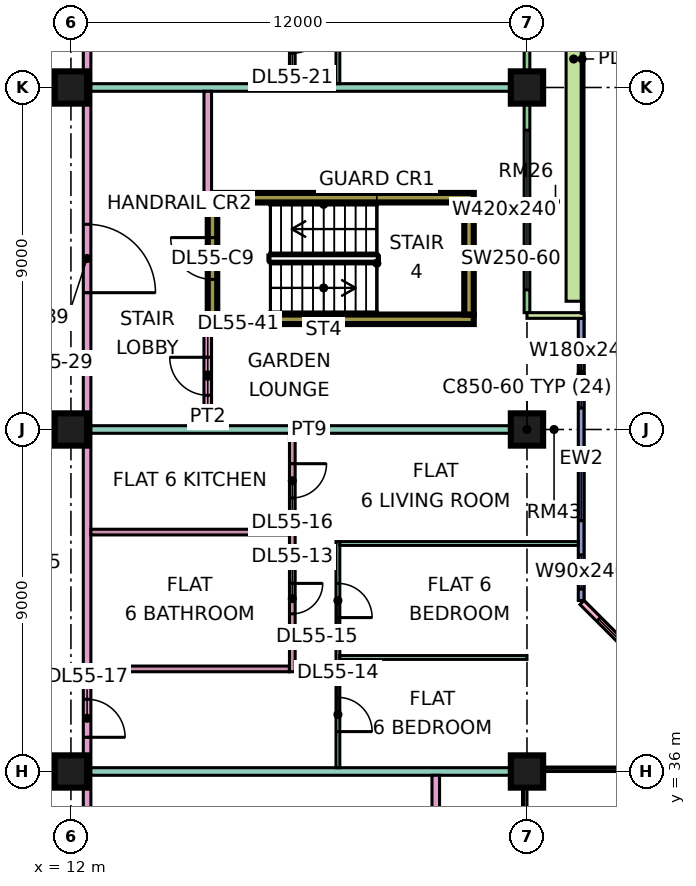
"""IFC4 building model, lengths in metres.
Left out: names, types, materials, properties, quantities, classifications, styles, units other than length and angle.
Written with IfcOpenShell. Run it as: python <this file> out.ifc"""

import sys

from ifc_helpers import new_model, si_unit, direction, frame, frame_2d, origin, origin_2d, place, context, subcontext, project, spatial, rectangle, extrude, element, fill, save


model = new_model("IFC4")
c1 = context("Model", 3, precision=1e-05, world=origin(), true_north=direction((0.0, 1.0)))
c2 = subcontext(c1, "Body", "Model", "MODEL_VIEW")
j1 = project(units=[si_unit("LENGTHUNIT", "METRE"), si_unit("PLANEANGLEUNIT", "RADIAN")], contexts=[c1])
p1 = place(None, origin())
s1 = spatial("IfcSite", under=j1, at=p1, CompositionType="ELEMENT")
p2 = place(p1, origin())
s2 = spatial("IfcBuilding", under=s1, at=p2, CompositionType="ELEMENT")
p3 = place(p2, frame((0.0, 0.0, 234.15)))
s3 = spatial("IfcBuildingStorey", under=s2, at=p3, CompositionType="ELEMENT", Elevation=234.15)
for number, where, z_axis, x_axis in (
    (1, (12.0, 36.0, 0.0), (0.0, 0.0, 1.0), (1.0, 0.0, 0.0)),
    (2, (12.0, 45.0, 0.0), (0.0, 0.0, 1.0), (1.0, 0.0, 0.0)),
    (3, (12.0, 54.0, 0.0), (0.0, 0.0, 1.0), (1.0, 0.0, 0.0)),
    (4, (24.0, 36.0, 0.0), (0.0, 0.0, 1.0), (1.0, 0.0, 0.0)),
    (5, (24.0, 45.0, 0.0), (0.0, 0.0, 1.0), (1.0, 0.0, 0.0)),
    (6, (24.0, 54.0, 0.0), (0.0, 0.0, 1.0), (1.0, 0.0, 0.0)),
):
    element("IfcColumn", number, at=place(p3, frame(where, z_axis=z_axis, x_axis=x_axis)), inside=s3, PredefinedType="COLUMN", context=c2, shape_type="SweptSolid", body=[
        extrude(rectangle(XDim=0.85, YDim=0.85, at=origin_2d()), origin(), (0.0, 0.0, 1.0), 3.75),
    ])
for number, where, z_axis, x_axis in (
    (7, (15.6, 47.9, 0.0), (0.0, 0.0, 1.0), (1.0, 0.0, 0.0)),
    (8, (15.6, 51.1, 0.0), (0.0, 0.0, 1.0), (1.0, 0.0, 0.0)),
):
    element("IfcWall", number, at=place(p3, frame(where, z_axis=z_axis, x_axis=x_axis)), inside=s3, PredefinedType="SHEAR", context=c2, shape_type="SweptSolid", body=[
        extrude(rectangle(XDim=7.0, YDim=0.25, at=frame_2d((3.5, 0.0))), origin(), (0.0, 0.0, 1.0), 3.75),
    ])
p4 = place(p3, frame((15.725, 48.025, 0.0), z_axis=(0.0, 0.0, 1.0), x_axis=(0.0, 1.0, 0.0)))
e9 = element("IfcWall", 9, at=p4, inside=s3, PredefinedType="SHEAR", context=c2, shape_type="SweptSolid", body=[
    extrude(rectangle(XDim=2.95, YDim=0.25, at=frame_2d((1.475, 0.0))), origin(), (0.0, 0.0, 1.0), 3.75),
])
p5 = place(p4, frame((0.925, 0.0, 0.0)))
e10 = element("IfcOpeningElement", 10, at=p5, cuts=e9, PredefinedType="OPENING", context=c2, shape_type="SweptSolid", body=[
    extrude(rectangle(XDim=1.1, YDim=2.2, at=frame_2d((0.55, 1.1))), frame((0.0, 0.135, 0.0), z_axis=(0.0, -1.0, 0.0), x_axis=(1.0, 0.0, 0.0)), (0.0, 0.0, 1.0), 0.27),
])
p6 = place(p3, frame((22.475, 48.025, 0.0), z_axis=(0.0, 0.0, 1.0), x_axis=(0.0, 1.0, 0.0)))
e11 = element("IfcWall", 11, at=p6, inside=s3, PredefinedType="SHEAR", context=c2, shape_type="SweptSolid", body=[
    extrude(rectangle(XDim=2.95, YDim=0.25, at=frame_2d((1.475, 0.0))), origin(), (0.0, 0.0, 1.0), 3.75),
])
p7 = place(p3, frame((28.447, 37.447, 0.0), z_axis=(0.0, 0.0, 1.0), x_axis=(-0.707106781187, 0.707106781187, 0.0)))
e12 = element("IfcWall", 12, at=p7, inside=s3, PredefinedType="SOLIDWALL", context=c2, shape_type="SweptSolid", body=[
    extrude(rectangle(XDim=4.243, YDim=0.15, at=frame_2d((2.121, 0.0))), origin(), (0.0, 0.0, 1.0), 3.35),
])
p8 = place(p7, frame((0.621, 0.0, 0.45)))
e13 = element("IfcOpeningElement", 13, at=p8, cuts=e12, PredefinedType="OPENING", context=c2, shape_type="SweptSolid", body=[
    extrude(rectangle(XDim=3.0, YDim=2.4, at=frame_2d((1.5, 1.2))), frame((0.0, 0.085, 0.0), z_axis=(0.0, -1.0, 0.0), x_axis=(1.0, 0.0, 0.0)), (0.0, 0.0, 1.0), 0.17),
])
p9 = place(p3, frame((25.425, 40.5, 0.0), z_axis=(0.0, 0.0, 1.0), x_axis=(0.0, 1.0, 0.0)))
e14 = element("IfcWall", 14, at=p9, inside=s3, PredefinedType="SOLIDWALL", context=c2, shape_type="SweptSolid", body=[
    extrude(rectangle(XDim=7.425, YDim=0.15, at=frame_2d((3.712, 0.0))), origin(), (0.0, 0.0, 1.0), 3.35),
])
p10 = place(p9, frame((0.3, 0.0, 0.45)))
e15 = element("IfcOpeningElement", 15, at=p10, cuts=e14, PredefinedType="OPENING", context=c2, shape_type="SweptSolid", body=[
    extrude(rectangle(XDim=0.9, YDim=2.4, at=frame_2d((0.45, 1.2))), frame((0.0, 0.085, 0.0), z_axis=(0.0, -1.0, 0.0), x_axis=(1.0, 0.0, 0.0)), (0.0, 0.0, 1.0), 0.17),
])
p11 = place(p9, frame((2.1, 0.0, 0.45)))
e16 = element("IfcOpeningElement", 16, at=p11, cuts=e14, PredefinedType="OPENING", context=c2, shape_type="SweptSolid", body=[
    extrude(rectangle(XDim=1.8, YDim=2.4, at=frame_2d((0.9, 1.2))), frame((0.0, 0.085, 0.0), z_axis=(0.0, -1.0, 0.0), x_axis=(1.0, 0.0, 0.0)), (0.0, 0.0, 1.0), 0.17),
])
p12 = place(p9, frame((5.062, 0.0, 0.45)))
e17 = element("IfcOpeningElement", 17, at=p12, cuts=e14, PredefinedType="OPENING", context=c2, shape_type="SweptSolid", body=[
    extrude(rectangle(XDim=1.8, YDim=2.4, at=frame_2d((0.9, 1.2))), frame((0.0, 0.085, 0.0), z_axis=(0.0, -1.0, 0.0), x_axis=(1.0, 0.0, 0.0)), (0.0, 0.0, 1.0), 0.17),
])
p13 = place(p3, frame((24.0, 48.075, 0.0), z_axis=(0.0, 0.0, 1.0), x_axis=(0.0, 1.0, 0.0)))
e18 = element("IfcWall", 18, at=p13, inside=s3, PredefinedType="SOLIDWALL", context=c2, shape_type="SweptSolid", body=[
    extrude(rectangle(XDim=13.35, YDim=0.15, at=frame_2d((6.675, 0.0))), origin(), (0.0, 0.0, 1.0), 3.35),
])
p14 = place(p13, frame((0.6, 0.0, 0.45)))
e19 = element("IfcOpeningElement", 19, at=p14, cuts=e18, PredefinedType="OPENING", context=c2, shape_type="SweptSolid", body=[
    extrude(rectangle(XDim=4.2, YDim=2.4, at=frame_2d((2.1, 1.2))), frame((0.0, 0.085, 0.0), z_axis=(0.0, -1.0, 0.0), x_axis=(1.0, 0.0, 0.0)), (0.0, 0.0, 1.0), 0.17),
])
p15 = place(p13, frame((7.087, 0.0, 0.0)))
e20 = element("IfcOpeningElement", 20, at=p15, cuts=e18, PredefinedType="OPENING", context=c2, shape_type="SweptSolid", body=[
    extrude(rectangle(XDim=1.2, YDim=2.4, at=frame_2d((0.6, 1.2))), frame((0.0, 0.085, 0.0), z_axis=(0.0, -1.0, 0.0), x_axis=(1.0, 0.0, 0.0)), (0.0, 0.0, 1.0), 0.17),
])
p16 = place(p13, frame((9.525, 0.0, 0.45)))
e21 = element("IfcOpeningElement", 21, at=p16, cuts=e18, PredefinedType="OPENING", context=c2, shape_type="SweptSolid", body=[
    extrude(rectangle(XDim=1.8, YDim=2.4, at=frame_2d((0.9, 1.2))), frame((0.0, 0.085, 0.0), z_axis=(0.0, -1.0, 0.0), x_axis=(1.0, 0.0, 0.0)), (0.0, 0.0, 1.0), 0.17),
])
p17 = place(p13, frame((12.188, 0.0, 0.45)))
e22 = element("IfcOpeningElement", 22, at=p17, cuts=e18, PredefinedType="OPENING", context=c2, shape_type="SweptSolid", body=[
    extrude(rectangle(XDim=0.9, YDim=2.4, at=frame_2d((0.45, 1.2))), frame((0.0, 0.085, 0.0), z_axis=(0.0, -1.0, 0.0), x_axis=(1.0, 0.0, 0.0)), (0.0, 0.0, 1.0), 0.17),
])
p18 = place(p3, frame((25.5, 48.0, 0.0), z_axis=(0.0, 0.0, 1.0), x_axis=(-1.0, 0.0, 0.0)))
e23 = element("IfcWall", 23, at=p18, inside=s3, PredefinedType="SOLIDWALL", context=c2, shape_type="SweptSolid", body=[
    extrude(rectangle(XDim=1.5, YDim=0.15, at=frame_2d((0.75, 0.0))), origin(), (0.0, 0.0, 1.0), 3.35),
])
p19 = place(p3, frame((25.229, 48.375, 0.0), z_axis=(0.0, 0.0, 1.0), x_axis=(0.0, 1.0, 0.0)))
e24 = element("IfcWall", 24, at=p19, inside=s3, PredefinedType="SOLIDWALL", context=c2, shape_type="SweptSolid", body=[
    extrude(rectangle(XDim=12.75, YDim=0.4, at=frame_2d((6.375, 0.0))), origin(), (0.0, 0.0, 1.0), 0.7),
])
p20 = place(p3, frame((12.425, 20.0, 0.0), z_axis=(0.0, 0.0, 1.0), x_axis=(0.0, 1.0, 0.0)))
e25 = element("IfcWall", 25, at=p20, inside=s3, PredefinedType="PARTITIONING", context=c2, shape_type="SweptSolid", body=[
    extrude(rectangle(XDim=43.0, YDim=0.2, at=frame_2d((21.5, 0.0))), origin(), (0.0, 0.0, 1.0), 3.35),
])
p21 = place(p20, frame((5.95, 0.0, 0.0)))
e26 = element("IfcOpeningElement", 26, at=p21, cuts=e25, PredefinedType="OPENING", context=c2, shape_type="SweptSolid", body=[
    extrude(rectangle(XDim=1.0, YDim=2.1, at=frame_2d((0.5, 1.05))), frame((0.0, 0.11, 0.0), z_axis=(0.0, -1.0, 0.0), x_axis=(1.0, 0.0, 0.0)), (0.0, 0.0, 1.0), 0.22),
])
p22 = place(p20, frame((12.0, 0.0, 0.0)))
e27 = element("IfcOpeningElement", 27, at=p22, cuts=e25, PredefinedType="OPENING", context=c2, shape_type="SweptSolid", body=[
    extrude(rectangle(XDim=1.0, YDim=2.1, at=frame_2d((0.5, 1.05))), frame((0.0, 0.11, 0.0), z_axis=(0.0, -1.0, 0.0), x_axis=(1.0, 0.0, 0.0)), (0.0, 0.0, 1.0), 0.22),
])
p23 = place(p20, frame((16.9, 0.0, 0.0)))
e28 = element("IfcOpeningElement", 28, at=p23, cuts=e25, PredefinedType="OPENING", context=c2, shape_type="SweptSolid", body=[
    extrude(rectangle(XDim=1.0, YDim=2.1, at=frame_2d((0.5, 1.05))), frame((0.0, 0.11, 0.0), z_axis=(0.0, -1.0, 0.0), x_axis=(1.0, 0.0, 0.0)), (0.0, 0.0, 1.0), 0.22),
])
p24 = place(p20, frame((41.05, 0.0, 0.0)))
e29 = element("IfcOpeningElement", 29, at=p24, cuts=e25, PredefinedType="OPENING", context=c2, shape_type="SweptSolid", body=[
    extrude(rectangle(XDim=1.0, YDim=2.1, at=frame_2d((0.5, 1.05))), frame((0.0, 0.11, 0.0), z_axis=(0.0, -1.0, 0.0), x_axis=(1.0, 0.0, 0.0)), (0.0, 0.0, 1.0), 0.22),
])
p25 = place(p20, frame((1.15, 0.0, 0.0)))
e30 = element("IfcOpeningElement", 30, at=p25, cuts=e25, PredefinedType="OPENING", context=c2, shape_type="SweptSolid", body=[
    extrude(rectangle(XDim=1.8, YDim=2.1, at=frame_2d((0.9, 1.05))), frame((0.0, 0.11, 0.0), z_axis=(0.0, -1.0, 0.0), x_axis=(1.0, 0.0, 0.0)), (0.0, 0.0, 1.0), 0.22),
])
p26 = place(p20, frame((28.6, 0.0, 0.0)))
e31 = element("IfcOpeningElement", 31, at=p26, cuts=e25, PredefinedType="OPENING", context=c2, shape_type="SweptSolid", body=[
    extrude(rectangle(XDim=1.8, YDim=2.1, at=frame_2d((0.9, 1.05))), frame((0.0, 0.11, 0.0), z_axis=(0.0, -1.0, 0.0), x_axis=(1.0, 0.0, 0.0)), (0.0, 0.0, 1.0), 0.22),
])
p27 = place(p3, frame((12.525, 36.0, 0.0), z_axis=(0.0, 0.0, 1.0), x_axis=(1.0, 0.0, 0.0)))
e32 = element("IfcWall", 32, at=p27, inside=s3, PredefinedType="PARTITIONING", context=c2, shape_type="SweptSolid", body=[
    extrude(rectangle(XDim=11.475, YDim=0.2, at=frame_2d((5.738, 0.0))), origin(), (0.0, 0.0, 1.0), 3.35),
])
for number, where, z_axis, x_axis in (
    (33, (12.525, 38.7, 0.0), (0.0, 0.0, 1.0), (1.0, 0.0, 0.0)),
    (34, (12.525, 42.3, 0.0), (0.0, 0.0, 1.0), (1.0, 0.0, 0.0)),
):
    element("IfcWall", number, at=place(p3, frame(where, z_axis=z_axis, x_axis=x_axis)), inside=s3, PredefinedType="PARTITIONING", context=c2, shape_type="SweptSolid", body=[
        extrude(rectangle(XDim=5.225, YDim=0.15, at=frame_2d((2.613, 0.0))), origin(), (0.0, 0.0, 1.0), 3.35),
    ])
p28 = place(p3, frame((12.525, 45.0, 0.0), z_axis=(0.0, 0.0, 1.0), x_axis=(1.0, 0.0, 0.0)))
e35 = element("IfcWall", 35, at=p28, inside=s3, PredefinedType="PARTITIONING", context=c2, shape_type="SweptSolid", body=[
    extrude(rectangle(XDim=11.475, YDim=0.2, at=frame_2d((5.738, 0.0))), origin(), (0.0, 0.0, 1.0), 3.35),
])
p29 = place(p3, frame((12.525, 54.0, 0.0), z_axis=(0.0, 0.0, 1.0), x_axis=(1.0, 0.0, 0.0)))
e36 = element("IfcWall", 36, at=p29, inside=s3, PredefinedType="PARTITIONING", context=c2, shape_type="SweptSolid", body=[
    extrude(rectangle(XDim=11.401, YDim=0.2, at=frame_2d((5.701, 0.0))), origin(), (0.0, 0.0, 1.0), 3.35),
])
p30 = place(p3, frame((15.6, 45.1, 0.0), z_axis=(0.0, 0.0, 1.0), x_axis=(0.0, 1.0, 0.0)))
e37 = element("IfcWall", 37, at=p30, inside=s3, PredefinedType="PARTITIONING", context=c2, shape_type="SweptSolid", body=[
    extrude(rectangle(XDim=2.675, YDim=0.2, at=frame_2d((1.337, 0.0))), origin(), (0.0, 0.0, 1.0), 3.35),
])
p31 = place(p30, frame((0.8, 0.0, 0.0)))
e38 = element("IfcOpeningElement", 38, at=p31, cuts=e37, PredefinedType="OPENING", context=c2, shape_type="SweptSolid", body=[
    extrude(rectangle(XDim=1.0, YDim=2.1, at=frame_2d((0.5, 1.05))), frame((0.0, 0.11, 0.0), z_axis=(0.0, -1.0, 0.0), x_axis=(1.0, 0.0, 0.0)), (0.0, 0.0, 1.0), 0.22),
])
p32 = place(p3, frame((15.6, 51.225, 0.0), z_axis=(0.0, 0.0, 1.0), x_axis=(0.0, 1.0, 0.0)))
e39 = element("IfcWall", 39, at=p32, inside=s3, PredefinedType="PARTITIONING", context=c2, shape_type="SweptSolid", body=[
    extrude(rectangle(XDim=2.675, YDim=0.2, at=frame_2d((1.337, 0.0))), origin(), (0.0, 0.0, 1.0), 3.35),
])
p33 = place(p3, frame((17.825, 38.625, 0.0), z_axis=(0.0, 0.0, 1.0), x_axis=(0.0, 1.0, 0.0)))
e40 = element("IfcWall", 40, at=p33, inside=s3, PredefinedType="PARTITIONING", context=c2, shape_type="SweptSolid", body=[
    extrude(rectangle(XDim=6.275, YDim=0.15, at=frame_2d((3.137, 0.0))), origin(), (0.0, 0.0, 1.0), 3.35),
])
p34 = place(p33, frame((1.525, 0.0, 0.0)))
e41 = element("IfcOpeningElement", 41, at=p34, cuts=e40, PredefinedType="OPENING", context=c2, shape_type="SweptSolid", body=[
    extrude(rectangle(XDim=0.8, YDim=2.1, at=frame_2d((0.4, 1.05))), frame((0.0, 0.085, 0.0), z_axis=(0.0, -1.0, 0.0), x_axis=(1.0, 0.0, 0.0)), (0.0, 0.0, 1.0), 0.17),
])
p35 = place(p33, frame((4.575, 0.0, 0.0)))
e42 = element("IfcOpeningElement", 42, at=p35, cuts=e40, PredefinedType="OPENING", context=c2, shape_type="SweptSolid", body=[
    extrude(rectangle(XDim=0.9, YDim=2.1, at=frame_2d((0.45, 1.05))), frame((0.0, 0.085, 0.0), z_axis=(0.0, -1.0, 0.0), x_axis=(1.0, 0.0, 0.0)), (0.0, 0.0, 1.0), 0.17),
])
p36 = place(p3, frame((17.825, 54.1, 0.0), z_axis=(0.0, 0.0, 1.0), x_axis=(0.0, 1.0, 0.0)))
e43 = element("IfcWall", 43, at=p36, inside=s3, PredefinedType="PARTITIONING", context=c2, shape_type="SweptSolid", body=[
    extrude(rectangle(XDim=5.975, YDim=0.15, at=frame_2d((2.987, 0.0))), origin(), (0.0, 0.0, 1.0), 3.35),
])
p37 = place(p36, frame((3.9, 0.0, 0.0)))
e44 = element("IfcOpeningElement", 44, at=p37, cuts=e43, PredefinedType="OPENING", context=c2, shape_type="SweptSolid", body=[
    extrude(rectangle(XDim=0.8, YDim=2.1, at=frame_2d((0.4, 1.05))), frame((0.0, 0.085, 0.0), z_axis=(0.0, -1.0, 0.0), x_axis=(1.0, 0.0, 0.0)), (0.0, 0.0, 1.0), 0.17),
])
p38 = place(p36, frame((0.8, 0.0, 0.0)))
e45 = element("IfcOpeningElement", 45, at=p38, cuts=e43, PredefinedType="OPENING", context=c2, shape_type="SweptSolid", body=[
    extrude(rectangle(XDim=0.9, YDim=2.1, at=frame_2d((0.45, 1.05))), frame((0.0, 0.085, 0.0), z_axis=(0.0, -1.0, 0.0), x_axis=(1.0, 0.0, 0.0)), (0.0, 0.0, 1.0), 0.17),
])
p39 = place(p3, frame((19.025, 36.1, 0.0), z_axis=(0.0, 0.0, 1.0), x_axis=(0.0, 1.0, 0.0)))
e46 = element("IfcWall", 46, at=p39, inside=s3, PredefinedType="PARTITIONING", context=c2, shape_type="SweptSolid", body=[
    extrude(rectangle(XDim=5.95, YDim=0.1, at=frame_2d((2.975, 0.0))), origin(), (0.0, 0.0, 1.0), 3.35),
])
p40 = place(p39, frame((0.95, 0.0, 0.0)))
e47 = element("IfcOpeningElement", 47, at=p40, cuts=e46, PredefinedType="OPENING", context=c2, shape_type="SweptSolid", body=[
    extrude(rectangle(XDim=0.9, YDim=2.1, at=frame_2d((0.45, 1.05))), frame((0.0, 0.06, 0.0), z_axis=(0.0, -1.0, 0.0), x_axis=(1.0, 0.0, 0.0)), (0.0, 0.0, 1.0), 0.12),
])
p41 = place(p39, frame((3.95, 0.0, 0.0)))
e48 = element("IfcOpeningElement", 48, at=p41, cuts=e46, PredefinedType="OPENING", context=c2, shape_type="SweptSolid", body=[
    extrude(rectangle(XDim=0.9, YDim=2.1, at=frame_2d((0.45, 1.05))), frame((0.0, 0.06, 0.0), z_axis=(0.0, -1.0, 0.0), x_axis=(1.0, 0.0, 0.0)), (0.0, 0.0, 1.0), 0.12),
])
p42 = place(p3, frame((19.025, 54.1, 0.0), z_axis=(0.0, 0.0, 1.0), x_axis=(0.0, 1.0, 0.0)))
e49 = element("IfcWall", 49, at=p42, inside=s3, PredefinedType="PARTITIONING", context=c2, shape_type="SweptSolid", body=[
    extrude(rectangle(XDim=2.85, YDim=0.1, at=frame_2d((1.425, 0.0))), origin(), (0.0, 0.0, 1.0), 3.35),
])
p43 = place(p42, frame((0.95, 0.0, 0.0)))
e50 = element("IfcOpeningElement", 50, at=p43, cuts=e49, PredefinedType="OPENING", context=c2, shape_type="SweptSolid", body=[
    extrude(rectangle(XDim=0.9, YDim=2.1, at=frame_2d((0.45, 1.05))), frame((0.0, 0.06, 0.0), z_axis=(0.0, -1.0, 0.0), x_axis=(1.0, 0.0, 0.0)), (0.0, 0.0, 1.0), 0.12),
])
p44 = place(p3, frame((19.075, 39.0, 0.0), z_axis=(0.0, 0.0, 1.0), x_axis=(1.0, 0.0, 0.0)))
e51 = element("IfcWall", 51, at=p44, inside=s3, PredefinedType="PARTITIONING", context=c2, shape_type="SweptSolid", body=[
    extrude(rectangle(XDim=4.925, YDim=0.1, at=frame_2d((2.462, 0.0))), origin(), (0.0, 0.0, 1.0), 3.35),
])
p45 = place(p3, frame((19.075, 42.0, 0.0), z_axis=(0.0, 0.0, 1.0), x_axis=(1.0, 0.0, 0.0)))
e52 = element("IfcWall", 52, at=p45, inside=s3, PredefinedType="PARTITIONING", context=c2, shape_type="SweptSolid", body=[
    extrude(rectangle(XDim=6.275, YDim=0.1, at=frame_2d((3.138, 0.0))), origin(), (0.0, 0.0, 1.0), 3.35),
])
p46 = place(p3, frame((21.6, 23.9, 0.0), z_axis=(0.0, 0.0, 1.0), x_axis=(0.0, 1.0, 0.0)))
e53 = element("IfcWall", 53, at=p46, inside=s3, PredefinedType="PARTITIONING", context=c2, shape_type="SweptSolid", body=[
    extrude(rectangle(XDim=12.0, YDim=0.2, at=frame_2d((6.0, 0.0))), origin(), (0.0, 0.0, 1.0), 3.35),
])
p47 = place(p8, origin())
e54 = element("IfcWindow", 54, at=p47, inside=s3, PartitioningType="SINGLE_PANEL", PredefinedType="WINDOW", context=c2, shape_type="SweptSolid", body=[
    extrude(rectangle(XDim=3.0, YDim=2.4, at=frame_2d((1.5, 1.2))), frame((0.0, 0.03, 0.0), z_axis=(0.0, -1.0, 0.0), x_axis=(1.0, 0.0, 0.0)), (0.0, 0.0, 1.0), 0.06),
])
fill(e13, e54)
p48 = place(p10, origin())
e55 = element("IfcWindow", 55, at=p48, inside=s3, PartitioningType="SINGLE_PANEL", PredefinedType="WINDOW", context=c2, shape_type="SweptSolid", body=[
    extrude(rectangle(XDim=0.9, YDim=2.4, at=frame_2d((0.45, 1.2))), frame((0.0, 0.03, 0.0), z_axis=(0.0, -1.0, 0.0), x_axis=(1.0, 0.0, 0.0)), (0.0, 0.0, 1.0), 0.06),
])
fill(e15, e55)
p49 = place(p11, origin())
e56 = element("IfcWindow", 56, at=p49, inside=s3, PartitioningType="SINGLE_PANEL", PredefinedType="WINDOW", context=c2, shape_type="SweptSolid", body=[
    extrude(rectangle(XDim=1.8, YDim=2.4, at=frame_2d((0.9, 1.2))), frame((0.0, 0.03, 0.0), z_axis=(0.0, -1.0, 0.0), x_axis=(1.0, 0.0, 0.0)), (0.0, 0.0, 1.0), 0.06),
])
fill(e16, e56)
p50 = place(p12, origin())
e57 = element("IfcWindow", 57, at=p50, inside=s3, PartitioningType="SINGLE_PANEL", PredefinedType="WINDOW", context=c2, shape_type="SweptSolid", body=[
    extrude(rectangle(XDim=1.8, YDim=2.4, at=frame_2d((0.9, 1.2))), frame((0.0, 0.03, 0.0), z_axis=(0.0, -1.0, 0.0), x_axis=(1.0, 0.0, 0.0)), (0.0, 0.0, 1.0), 0.06),
])
fill(e17, e57)
p51 = place(p14, origin())
e58 = element("IfcWindow", 58, at=p51, inside=s3, PartitioningType="SINGLE_PANEL", PredefinedType="WINDOW", context=c2, shape_type="SweptSolid", body=[
    extrude(rectangle(XDim=4.2, YDim=2.4, at=frame_2d((2.1, 1.2))), frame((0.0, 0.03, 0.0), z_axis=(0.0, -1.0, 0.0), x_axis=(1.0, 0.0, 0.0)), (0.0, 0.0, 1.0), 0.06),
])
fill(e19, e58)
p52 = place(p5, frame((1.1, 0.0, 0.0), z_axis=(0.0, 0.0, 1.0), x_axis=(-1.0, 0.0, 0.0)))
e59 = element("IfcDoor", 59, at=p52, inside=s3, OperationType="SINGLE_SWING_RIGHT", PredefinedType="DOOR", context=c2, shape_type="SweptSolid", body=[
    extrude(rectangle(XDim=1.1, YDim=2.2, at=frame_2d((0.55, 1.1))), frame((0.0, 0.025, 0.0), z_axis=(0.0, -1.0, 0.0), x_axis=(1.0, 0.0, 0.0)), (0.0, 0.0, 1.0), 0.05),
])
fill(e10, e59)
p53 = place(p34, origin())
e60 = element("IfcDoor", 60, at=p53, inside=s3, OperationType="SINGLE_SWING_RIGHT", PredefinedType="DOOR", context=c2, shape_type="SweptSolid", body=[
    extrude(rectangle(XDim=0.8, YDim=2.1, at=frame_2d((0.4, 1.05))), frame((0.0, 0.025, 0.0), z_axis=(0.0, -1.0, 0.0), x_axis=(1.0, 0.0, 0.0)), (0.0, 0.0, 1.0), 0.05),
])
fill(e41, e60)
p54 = place(p40, frame((0.9, 0.0, 0.0), z_axis=(0.0, 0.0, 1.0), x_axis=(-1.0, 0.0, 0.0)))
e61 = element("IfcDoor", 61, at=p54, inside=s3, OperationType="SINGLE_SWING_LEFT", PredefinedType="DOOR", context=c2, shape_type="SweptSolid", body=[
    extrude(rectangle(XDim=0.9, YDim=2.1, at=frame_2d((0.45, 1.05))), frame((0.0, 0.025, 0.0), z_axis=(0.0, -1.0, 0.0), x_axis=(1.0, 0.0, 0.0)), (0.0, 0.0, 1.0), 0.05),
])
fill(e47, e61)
p55 = place(p41, frame((0.9, 0.0, 0.0), z_axis=(0.0, 0.0, 1.0), x_axis=(-1.0, 0.0, 0.0)))
e62 = element("IfcDoor", 62, at=p55, inside=s3, OperationType="SINGLE_SWING_LEFT", PredefinedType="DOOR", context=c2, shape_type="SweptSolid", body=[
    extrude(rectangle(XDim=0.9, YDim=2.1, at=frame_2d((0.45, 1.05))), frame((0.0, 0.025, 0.0), z_axis=(0.0, -1.0, 0.0), x_axis=(1.0, 0.0, 0.0)), (0.0, 0.0, 1.0), 0.05),
])
fill(e48, e62)
p56 = place(p35, origin())
e63 = element("IfcDoor", 63, at=p56, inside=s3, OperationType="SINGLE_SWING_RIGHT", PredefinedType="DOOR", context=c2, shape_type="SweptSolid", body=[
    extrude(rectangle(XDim=0.9, YDim=2.1, at=frame_2d((0.45, 1.05))), frame((0.0, 0.025, 0.0), z_axis=(0.0, -1.0, 0.0), x_axis=(1.0, 0.0, 0.0)), (0.0, 0.0, 1.0), 0.05),
])
fill(e42, e63)
p57 = place(p23, frame((1.0, 0.0, 0.0), z_axis=(0.0, 0.0, 1.0), x_axis=(-1.0, 0.0, 0.0)))
e64 = element("IfcDoor", 64, at=p57, inside=s3, OperationType="SINGLE_SWING_LEFT", PredefinedType="DOOR", context=c2, shape_type="SweptSolid", body=[
    extrude(rectangle(XDim=1.0, YDim=2.1, at=frame_2d((0.5, 1.05))), frame((0.0, 0.025, 0.0), z_axis=(0.0, -1.0, 0.0), x_axis=(1.0, 0.0, 0.0)), (0.0, 0.0, 1.0), 0.05),
])
fill(e28, e64)
p58 = place(p38, origin())
e65 = element("IfcDoor", 65, at=p58, inside=s3, OperationType="SINGLE_SWING_RIGHT", PredefinedType="DOOR", context=c2, shape_type="SweptSolid", body=[
    extrude(rectangle(XDim=0.9, YDim=2.1, at=frame_2d((0.45, 1.05))), frame((0.0, 0.025, 0.0), z_axis=(0.0, -1.0, 0.0), x_axis=(1.0, 0.0, 0.0)), (0.0, 0.0, 1.0), 0.05),
])
fill(e45, e65)
p59 = place(p26, frame((1.8, 0.0, 0.0), z_axis=(0.0, 0.0, 1.0), x_axis=(-1.0, 0.0, 0.0)))
e66 = element("IfcDoor", 66, at=p59, inside=s3, OperationType="DOUBLE_DOOR_SINGLE_SWING", PredefinedType="DOOR", context=c2, shape_type="SweptSolid", body=[
    extrude(rectangle(XDim=1.8, YDim=2.1, at=frame_2d((0.9, 1.05))), frame((0.0, 0.025, 0.0), z_axis=(0.0, -1.0, 0.0), x_axis=(1.0, 0.0, 0.0)), (0.0, 0.0, 1.0), 0.05),
])
fill(e31, e66)
p60 = place(p31, frame((1.0, 0.0, 0.0), z_axis=(0.0, 0.0, 1.0), x_axis=(-1.0, 0.0, 0.0)))
e67 = element("IfcDoor", 67, at=p60, inside=s3, OperationType="SINGLE_SWING_RIGHT", PredefinedType="DOOR", context=c2, shape_type="SweptSolid", body=[
    extrude(rectangle(XDim=1.0, YDim=2.1, at=frame_2d((0.5, 1.05))), frame((0.0, 0.025, 0.0), z_axis=(0.0, -1.0, 0.0), x_axis=(1.0, 0.0, 0.0)), (0.0, 0.0, 1.0), 0.05),
])
fill(e38, e67)
save(model, sys.argv[1])
